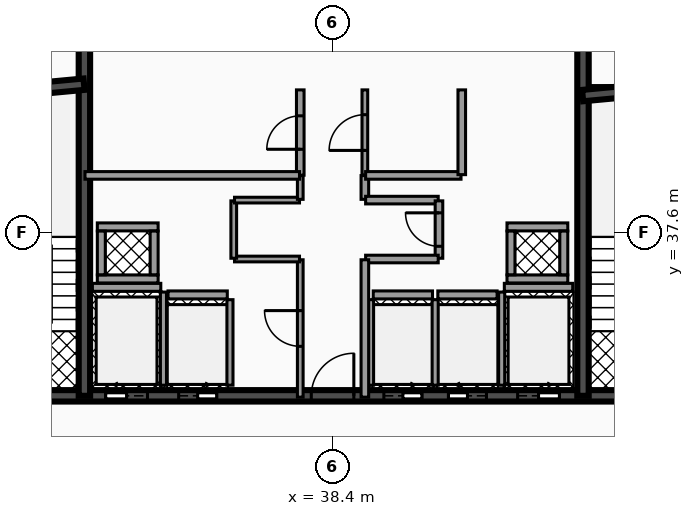
"""IFC4 building model, lengths in metres.
Left out: names, types, materials, properties, quantities, classifications, styles, units other than length and angle.
Written with IfcOpenShell. Run it as: python <this file> out.ifc"""

import sys

from ifc_helpers import new_model, si_unit, direction, frame, frame_2d, origin, place, context, subcontext, project, spatial, rectangle, extrude, element, fill, save


model = new_model("IFC4")
c1 = context("Model", 3, precision=1e-05, world=origin(), true_north=direction((0.0, 1.0)))
c2 = subcontext(c1, "Body", "Model", "MODEL_VIEW")
j1 = project(units=[si_unit("LENGTHUNIT", "METRE"), si_unit("PLANEANGLEUNIT", "RADIAN")], contexts=[c1])
p1 = place(None, origin())
s1 = spatial("IfcSite", under=j1, at=p1, CompositionType="ELEMENT")
p2 = place(p1, origin())
s2 = spatial("IfcBuilding", under=s1, at=p2, CompositionType="ELEMENT")
p3 = place(p2, frame((0.0, 0.0, 239.36)))
s3 = spatial("IfcBuildingStorey", under=s2, at=p3, CompositionType="ELEMENT", Elevation=239.36)
p4 = place(p3, frame((28.5, 33.3, 0.0), z_axis=(0.0, 0.0, 1.0), x_axis=(1.0, 0.0, 0.0)))
e1 = element("IfcWall", 1, at=p4, inside=s3, PredefinedType="SHEAR", context=c2, shape_type="SweptSolid", body=[
    extrude(rectangle(XDim=19.86, YDim=0.3, at=frame_2d((9.93, 0.0))), origin(), (0.0, 0.0, 1.0), 3.18),
])
p5 = place(p4, frame((3.93, 0.0, 0.0)))
e2 = element("IfcOpeningElement", 2, at=p5, cuts=e1, PredefinedType="OPENING", context=c2, shape_type="SweptSolid", body=[
    extrude(rectangle(XDim=1.1, YDim=2.15, at=frame_2d((0.55, 1.075))), frame((0.0, 0.16, 0.0), z_axis=(0.0, -1.0, 0.0), x_axis=(1.0, 0.0, 0.0)), (0.0, 0.0, 1.0), 0.32),
])
p6 = place(p4, frame((14.77, 0.0, 0.0)))
e3 = element("IfcOpeningElement", 3, at=p6, cuts=e1, PredefinedType="OPENING", context=c2, shape_type="SweptSolid", body=[
    extrude(rectangle(XDim=1.1, YDim=2.15, at=frame_2d((0.55, 1.075))), frame((0.0, 0.16, 0.0), z_axis=(0.0, -1.0, 0.0), x_axis=(1.0, 0.0, 0.0)), (0.0, 0.0, 1.0), 0.32),
])
p7 = place(p4, frame((11.25, 0.0, 0.0)))
e4 = element("IfcOpeningElement", 4, at=p7, cuts=e1, PredefinedType="OPENING", context=c2, shape_type="SweptSolid", body=[
    extrude(rectangle(XDim=1.0, YDim=2.1, at=frame_2d((0.5, 1.05))), frame((0.0, 0.16, 0.0), z_axis=(0.0, -1.0, 0.0), x_axis=(1.0, 0.0, 0.0)), (0.0, 0.0, 1.0), 0.32),
])
p8 = place(p4, frame((12.95, 0.0, 0.0)))
e5 = element("IfcOpeningElement", 5, at=p8, cuts=e1, PredefinedType="OPENING", context=c2, shape_type="SweptSolid", body=[
    extrude(rectangle(XDim=1.0, YDim=2.1, at=frame_2d((0.5, 1.05))), frame((0.0, 0.16, 0.0), z_axis=(0.0, -1.0, 0.0), x_axis=(1.0, 0.0, 0.0)), (0.0, 0.0, 1.0), 0.32),
])
p9 = place(p4, frame((5.85, 0.0, 0.0)))
e6 = element("IfcOpeningElement", 6, at=p9, cuts=e1, PredefinedType="OPENING", context=c2, shape_type="SweptSolid", body=[
    extrude(rectangle(XDim=1.0, YDim=2.1, at=frame_2d((0.5, 1.05))), frame((0.0, 0.16, 0.0), z_axis=(0.0, -1.0, 0.0), x_axis=(1.0, 0.0, 0.0)), (0.0, 0.0, 1.0), 0.32),
])
p10 = place(p4, frame((1.21, 0.0, 0.0)))
e7 = element("IfcOpeningElement", 7, at=p10, cuts=e1, PredefinedType="OPENING", context=c2, shape_type="SweptSolid", body=[
    extrude(rectangle(XDim=1.1, YDim=2.2, at=frame_2d((0.55, 1.1))), frame((0.0, 0.16, 0.0), z_axis=(0.0, -1.0, 0.0), x_axis=(1.0, 0.0, 0.0)), (0.0, 0.0, 1.0), 0.32),
])
p11 = place(p4, frame((9.34, 0.0, 0.0)))
e8 = element("IfcOpeningElement", 8, at=p11, cuts=e1, PredefinedType="OPENING", context=c2, shape_type="SweptSolid", body=[
    extrude(rectangle(XDim=1.12, YDim=2.05, at=frame_2d((0.56, 1.025))), frame((0.0, 0.16, 0.0), z_axis=(0.0, -1.0, 0.0), x_axis=(1.0, 0.0, 0.0)), (0.0, 0.0, 1.0), 0.32),
])
p12 = place(p4, frame((17.55, 0.0, 0.0)))
e9 = element("IfcOpeningElement", 9, at=p12, cuts=e1, PredefinedType="OPENING", context=c2, shape_type="SweptSolid", body=[
    extrude(rectangle(XDim=1.1, YDim=2.2, at=frame_2d((0.55, 1.1))), frame((0.0, 0.16, 0.0), z_axis=(0.0, -1.0, 0.0), x_axis=(1.0, 0.0, 0.0)), (0.0, 0.0, 1.0), 0.32),
])
for number, where, z_axis, x_axis in (
    (10, (31.87, 33.3, 0.0), (0.0, 0.0, 1.0), (0.0, 1.0, 0.0)),
    (11, (44.99, 33.3, 0.0), (0.0, 0.0, 1.0), (0.0, 1.0, 0.0)),
):
    element("IfcWall", number, at=place(p3, frame(where, z_axis=z_axis, x_axis=x_axis)), inside=s3, PredefinedType="SHEAR", context=c2, shape_type="SweptSolid", body=[
        extrude(rectangle(XDim=10.1, YDim=0.3, at=frame_2d((5.05, 0.0))), origin(), (0.0, 0.0, 1.0), 3.18),
    ])
p13 = place(p3, frame((28.64, 41.2, 0.0), z_axis=(0.0, 0.0, 1.0), x_axis=(0.995687118776, 0.092774789157, 0.0)))
e12 = element("IfcWall", 12, at=p13, inside=s3, PredefinedType="SHEAR", context=c2, shape_type="SweptSolid", body=[
    extrude(rectangle(XDim=3.234, YDim=0.3, at=frame_2d((1.617, 0.0))), origin(), (0.0, 0.0, 1.0), 3.18),
])
p14 = place(p3, frame((44.98, 41.2, 0.0), z_axis=(0.0, 0.0, 1.0), x_axis=(0.995686468965, 0.09278176286, 0.0)))
e13 = element("IfcWall", 13, at=p14, inside=s3, PredefinedType="SHEAR", context=c2, shape_type="SweptSolid", body=[
    extrude(rectangle(XDim=3.234, YDim=0.3, at=frame_2d((1.617, 0.0))), origin(), (0.0, 0.0, 1.0), 3.18),
])
p15 = place(p3, frame((32.08, 36.155, 0.0), z_axis=(0.0, 0.0, 1.0), x_axis=(1.0, 0.0, 0.0)))
e14 = element("IfcWall", 14, at=p15, inside=s3, PredefinedType="SOLIDWALL", context=c2, shape_type="SweptSolid", body=[
    extrude(rectangle(XDim=1.8, YDim=0.21, at=frame_2d((0.9, 0.0))), origin(), (0.0, 0.0, 1.0), 3.18),
])
p16 = place(p3, frame((33.95, 33.58, 0.0), z_axis=(0.0, 0.0, 1.0), x_axis=(0.0, 1.0, 0.0)))
e15 = element("IfcWall", 15, at=p16, inside=s3, PredefinedType="SOLIDWALL", context=c2, shape_type="SweptSolid", body=[
    extrude(rectangle(XDim=2.45, YDim=0.16, at=frame_2d((1.225, 0.0))), origin(), (0.0, 0.0, 1.0), 3.18),
])
p17 = place(p3, frame((42.92, 36.155, 0.0), z_axis=(0.0, 0.0, 1.0), x_axis=(1.0, 0.0, 0.0)))
e16 = element("IfcWall", 16, at=p17, inside=s3, PredefinedType="SOLIDWALL", context=c2, shape_type="SweptSolid", body=[
    extrude(rectangle(XDim=1.8, YDim=0.21, at=frame_2d((0.9, 0.0))), origin(), (0.0, 0.0, 1.0), 3.18),
])
p18 = place(p3, frame((42.85, 33.58, 0.0), z_axis=(0.0, 0.0, 1.0), x_axis=(0.0, 1.0, 0.0)))
e17 = element("IfcWall", 17, at=p18, inside=s3, PredefinedType="SOLIDWALL", context=c2, shape_type="SweptSolid", body=[
    extrude(rectangle(XDim=2.45, YDim=0.16, at=frame_2d((1.225, 0.0))), origin(), (0.0, 0.0, 1.0), 3.18),
])
p19 = place(p3, frame((39.47, 35.955, 0.0), z_axis=(0.0, 0.0, 1.0), x_axis=(1.0, 0.0, 0.0)))
e18 = element("IfcWall", 18, at=p19, inside=s3, PredefinedType="SOLIDWALL", context=c2, shape_type="SweptSolid", body=[
    extrude(rectangle(XDim=1.56, YDim=0.21, at=frame_2d((0.78, 0.0))), origin(), (0.0, 0.0, 1.0), 3.18),
])
for number, where, z_axis, x_axis in (
    (19, (39.4, 33.58, 0.0), (0.0, 0.0, 1.0), (0.0, 1.0, 0.0)),
    (20, (41.1, 33.58, 0.0), (0.0, 0.0, 1.0), (0.0, 1.0, 0.0)),
):
    element("IfcWall", number, at=place(p3, frame(where, z_axis=z_axis, x_axis=x_axis)), inside=s3, PredefinedType="SOLIDWALL", context=c2, shape_type="SweptSolid", body=[
        extrude(rectangle(XDim=2.25, YDim=0.16, at=frame_2d((1.125, 0.0))), origin(), (0.0, 0.0, 1.0), 3.18),
    ])
p20 = place(p3, frame((41.17, 35.955, 0.0), z_axis=(0.0, 0.0, 1.0), x_axis=(1.0, 0.0, 0.0)))
e21 = element("IfcWall", 21, at=p20, inside=s3, PredefinedType="SOLIDWALL", context=c2, shape_type="SweptSolid", body=[
    extrude(rectangle(XDim=1.56, YDim=0.21, at=frame_2d((0.78, 0.0))), origin(), (0.0, 0.0, 1.0), 3.18),
])
p21 = place(p3, frame((34.07, 35.955, 0.0), z_axis=(0.0, 0.0, 1.0), x_axis=(1.0, 0.0, 0.0)))
e22 = element("IfcWall", 22, at=p21, inside=s3, PredefinedType="SOLIDWALL", context=c2, shape_type="SweptSolid", body=[
    extrude(rectangle(XDim=1.56, YDim=0.21, at=frame_2d((0.78, 0.0))), origin(), (0.0, 0.0, 1.0), 3.18),
])
p22 = place(p3, frame((35.7, 33.58, 0.0), z_axis=(0.0, 0.0, 1.0), x_axis=(0.0, 1.0, 0.0)))
e23 = element("IfcWall", 23, at=p22, inside=s3, PredefinedType="SOLIDWALL", context=c2, shape_type="SweptSolid", body=[
    extrude(rectangle(XDim=2.25, YDim=0.16, at=frame_2d((1.125, 0.0))), origin(), (0.0, 0.0, 1.0), 3.18),
])
for number, where, z_axis, x_axis in (
    (24, (32.21, 36.375, 0.0), (0.0, 0.0, 1.0), (1.0, 0.0, 0.0)),
    (25, (32.21, 37.745, 0.0), (0.0, 0.0, 1.0), (1.0, 0.0, 0.0)),
):
    element("IfcWall", number, at=place(p3, frame(where, z_axis=z_axis, x_axis=x_axis)), inside=s3, PredefinedType="SOLIDWALL", context=c2, shape_type="SweptSolid", body=[
        extrude(rectangle(XDim=1.6, YDim=0.21, at=frame_2d((0.8, 0.0))), origin(), (0.0, 0.0, 1.0), 3.18),
    ])
for number, where, z_axis, x_axis in (
    (26, (32.315, 36.485, 0.0), (0.0, 0.0, 1.0), (0.0, 1.0, 0.0)),
    (27, (33.705, 36.485, 0.0), (0.0, 0.0, 1.0), (0.0, 1.0, 0.0)),
):
    element("IfcWall", number, at=place(p3, frame(where, z_axis=z_axis, x_axis=x_axis)), inside=s3, PredefinedType="SOLIDWALL", context=c2, shape_type="SweptSolid", body=[
        extrude(rectangle(XDim=1.15, YDim=0.21, at=frame_2d((0.575, 0.0))), origin(), (0.0, 0.0, 1.0), 3.18),
    ])
for number, where, z_axis, x_axis in (
    (28, (42.99, 36.375, 0.0), (0.0, 0.0, 1.0), (1.0, 0.0, 0.0)),
    (29, (42.99, 37.745, 0.0), (0.0, 0.0, 1.0), (1.0, 0.0, 0.0)),
):
    element("IfcWall", number, at=place(p3, frame(where, z_axis=z_axis, x_axis=x_axis)), inside=s3, PredefinedType="SOLIDWALL", context=c2, shape_type="SweptSolid", body=[
        extrude(rectangle(XDim=1.6, YDim=0.21, at=frame_2d((0.8, 0.0))), origin(), (0.0, 0.0, 1.0), 3.18),
    ])
for number, where, z_axis, x_axis in (
    (30, (43.095, 36.485, 0.0), (0.0, 0.0, 1.0), (0.0, 1.0, 0.0)),
    (31, (44.485, 36.485, 0.0), (0.0, 0.0, 1.0), (0.0, 1.0, 0.0)),
):
    element("IfcWall", number, at=place(p3, frame(where, z_axis=z_axis, x_axis=x_axis)), inside=s3, PredefinedType="SOLIDWALL", context=c2, shape_type="SweptSolid", body=[
        extrude(rectangle(XDim=1.15, YDim=0.21, at=frame_2d((0.575, 0.0))), origin(), (0.0, 0.0, 1.0), 3.18),
    ])
p23 = place(p3, frame((37.55, 33.265, 0.0), z_axis=(0.0, 0.0, 1.0), x_axis=(0.0, 1.0, 0.0)))
e32 = element("IfcWall", 32, at=p23, inside=s3, PredefinedType="PARTITIONING", context=c2, shape_type="SweptSolid", body=[
    extrude(rectangle(XDim=3.615, YDim=0.15, at=frame_2d((1.808, 0.0))), origin(), (0.0, 0.0, 1.0), 2.235),
])
p24 = place(p23, frame((1.337, 0.0, 0.0)))
e33 = element("IfcOpeningElement", 33, at=p24, cuts=e32, PredefinedType="OPENING", context=c2, shape_type="SweptSolid", body=[
    extrude(rectangle(XDim=0.94, YDim=2.05, at=frame_2d((0.47, 1.025))), frame((0.0, 0.085, 0.0), z_axis=(0.0, -1.0, 0.0), x_axis=(1.0, 0.0, 0.0)), (0.0, 0.0, 1.0), 0.17),
])
p25 = place(p3, frame((35.82, 36.9, 0.0), z_axis=(0.0, 0.0, 1.0), x_axis=(1.0, 0.0, 0.0)))
e34 = element("IfcWall", 34, at=p25, inside=s3, PredefinedType="PARTITIONING", context=c2, shape_type="SweptSolid", body=[
    extrude(rectangle(XDim=1.71, YDim=0.15, at=frame_2d((0.855, 0.0))), origin(), (0.0, 0.0, 1.0), 2.235),
])
p26 = place(p3, frame((35.8, 36.92, 0.0), z_axis=(0.0, 0.0, 1.0), x_axis=(0.0, 1.0, 0.0)))
e35 = element("IfcWall", 35, at=p26, inside=s3, PredefinedType="PARTITIONING", context=c2, shape_type="SweptSolid", body=[
    extrude(rectangle(XDim=1.51, YDim=0.15, at=frame_2d((0.755, 0.0))), origin(), (0.0, 0.0, 1.0), 2.235),
])
p27 = place(p3, frame((35.82, 38.45, 0.0), z_axis=(0.0, 0.0, 1.0), x_axis=(1.0, 0.0, 0.0)))
e36 = element("IfcWall", 36, at=p27, inside=s3, PredefinedType="PARTITIONING", context=c2, shape_type="SweptSolid", body=[
    extrude(rectangle(XDim=1.71, YDim=0.15, at=frame_2d((0.855, 0.0))), origin(), (0.0, 0.0, 1.0), 2.235),
])
p28 = place(p3, frame((37.55, 38.47, 0.0), z_axis=(0.0, 0.0, 1.0), x_axis=(0.0, 1.0, 0.0)))
e37 = element("IfcWall", 37, at=p28, inside=s3, PredefinedType="PARTITIONING", context=c2, shape_type="SweptSolid", body=[
    extrude(rectangle(XDim=0.625, YDim=0.15, at=frame_2d((0.312, 0.0))), origin(), (0.0, 0.0, 1.0), 2.235),
])
p29 = place(p3, frame((37.55, 39.105, 0.0), z_axis=(0.0, 0.0, 1.0), x_axis=(0.0, 1.0, 0.0)))
e38 = element("IfcWall", 38, at=p29, inside=s3, PredefinedType="PARTITIONING", context=c2, shape_type="SweptSolid", body=[
    extrude(rectangle(XDim=2.245, YDim=0.2, at=frame_2d((1.123, 0.0))), origin(), (0.0, 0.0, 1.0), 2.235),
])
p30 = place(p29, frame((0.683, 0.0, 0.0)))
e39 = element("IfcOpeningElement", 39, at=p30, cuts=e38, PredefinedType="OPENING", context=c2, shape_type="SweptSolid", body=[
    extrude(rectangle(XDim=0.88, YDim=2.05, at=frame_2d((0.44, 1.025))), frame((0.0, 0.11, 0.0), z_axis=(0.0, -1.0, 0.0), x_axis=(1.0, 0.0, 0.0)), (0.0, 0.0, 1.0), 0.22),
])
p31 = place(p3, frame((39.25, 38.47, 0.0), z_axis=(0.0, 0.0, 1.0), x_axis=(0.0, 1.0, 0.0)))
e40 = element("IfcWall", 40, at=p31, inside=s3, PredefinedType="PARTITIONING", context=c2, shape_type="SweptSolid", body=[
    extrude(rectangle(XDim=0.625, YDim=0.2, at=frame_2d((0.312, 0.0))), origin(), (0.0, 0.0, 1.0), 2.235),
])
p32 = place(p3, frame((39.27, 38.45, 0.0), z_axis=(0.0, 0.0, 1.0), x_axis=(1.0, 0.0, 0.0)))
e41 = element("IfcWall", 41, at=p32, inside=s3, PredefinedType="PARTITIONING", context=c2, shape_type="SweptSolid", body=[
    extrude(rectangle(XDim=1.91, YDim=0.2, at=frame_2d((0.955, 0.0))), origin(), (0.0, 0.0, 1.0), 2.235),
])
p33 = place(p3, frame((41.2, 36.92, 0.0), z_axis=(0.0, 0.0, 1.0), x_axis=(0.0, 1.0, 0.0)))
e42 = element("IfcWall", 42, at=p33, inside=s3, PredefinedType="PARTITIONING", context=c2, shape_type="SweptSolid", body=[
    extrude(rectangle(XDim=1.51, YDim=0.2, at=frame_2d((0.755, 0.0))), origin(), (0.0, 0.0, 1.0), 2.235),
])
p34 = place(p33, frame((0.315, 0.0, 0.0)))
e43 = element("IfcOpeningElement", 43, at=p34, cuts=e42, PredefinedType="OPENING", context=c2, shape_type="SweptSolid", body=[
    extrude(rectangle(XDim=0.88, YDim=2.05, at=frame_2d((0.44, 1.025))), frame((0.0, 0.11, 0.0), z_axis=(0.0, -1.0, 0.0), x_axis=(1.0, 0.0, 0.0)), (0.0, 0.0, 1.0), 0.22),
])
p35 = place(p3, frame((39.27, 36.9, 0.0), z_axis=(0.0, 0.0, 1.0), x_axis=(1.0, 0.0, 0.0)))
e44 = element("IfcWall", 44, at=p35, inside=s3, PredefinedType="PARTITIONING", context=c2, shape_type="SweptSolid", body=[
    extrude(rectangle(XDim=1.91, YDim=0.2, at=frame_2d((0.955, 0.0))), origin(), (0.0, 0.0, 1.0), 2.235),
])
p36 = place(p3, frame((39.25, 33.265, 0.0), z_axis=(0.0, 0.0, 1.0), x_axis=(0.0, 1.0, 0.0)))
e45 = element("IfcWall", 45, at=p36, inside=s3, PredefinedType="PARTITIONING", context=c2, shape_type="SweptSolid", body=[
    extrude(rectangle(XDim=3.615, YDim=0.2, at=frame_2d((1.808, 0.0))), origin(), (0.0, 0.0, 1.0), 2.235),
])
p37 = place(p3, frame((39.25, 39.105, 0.0), z_axis=(0.0, 0.0, 1.0), x_axis=(0.0, 1.0, 0.0)))
e46 = element("IfcWall", 46, at=p37, inside=s3, PredefinedType="PARTITIONING", context=c2, shape_type="SweptSolid", body=[
    extrude(rectangle(XDim=2.245, YDim=0.15, at=frame_2d((1.123, 0.0))), origin(), (0.0, 0.0, 1.0), 2.235),
])
p38 = place(p37, frame((0.653, 0.0, 0.0)))
e47 = element("IfcOpeningElement", 47, at=p38, cuts=e46, PredefinedType="OPENING", context=c2, shape_type="SweptSolid", body=[
    extrude(rectangle(XDim=0.94, YDim=2.05, at=frame_2d((0.47, 1.025))), frame((0.0, 0.085, 0.0), z_axis=(0.0, -1.0, 0.0), x_axis=(1.0, 0.0, 0.0)), (0.0, 0.0, 1.0), 0.17),
])
p39 = place(p3, frame((31.885, 39.1, 0.0), z_axis=(0.0, 0.0, 1.0), x_axis=(1.0, 0.0, 0.0)))
e48 = element("IfcWall", 48, at=p39, inside=s3, PredefinedType="PARTITIONING", context=c2, shape_type="SweptSolid", body=[
    extrude(rectangle(XDim=5.645, YDim=0.2, at=frame_2d((2.823, 0.0))), origin(), (0.0, 0.0, 1.0), 2.235),
])
p40 = place(p3, frame((39.27, 39.1, 0.0), z_axis=(0.0, 0.0, 1.0), x_axis=(1.0, 0.0, 0.0)))
e49 = element("IfcWall", 49, at=p40, inside=s3, PredefinedType="PARTITIONING", context=c2, shape_type="SweptSolid", body=[
    extrude(rectangle(XDim=2.51, YDim=0.2, at=frame_2d((1.255, 0.0))), origin(), (0.0, 0.0, 1.0), 2.235),
])
p41 = place(p3, frame((41.8, 39.12, 0.0), z_axis=(0.0, 0.0, 1.0), x_axis=(0.0, 1.0, 0.0)))
e50 = element("IfcWall", 50, at=p41, inside=s3, PredefinedType="PARTITIONING", context=c2, shape_type="SweptSolid", body=[
    extrude(rectangle(XDim=2.23, YDim=0.2, at=frame_2d((1.115, 0.0))), origin(), (0.0, 0.0, 1.0), 2.235),
])
p42 = place(p5, origin())
e51 = element("IfcDoor", 51, at=p42, inside=s3, OperationType="SLIDING_TO_LEFT", PredefinedType="DOOR", context=c2, shape_type="SweptSolid", body=[
    extrude(rectangle(XDim=1.1, YDim=2.15, at=frame_2d((0.55, 1.075))), frame((0.0, 0.025, 0.0), z_axis=(0.0, -1.0, 0.0), x_axis=(1.0, 0.0, 0.0)), (0.0, 0.0, 1.0), 0.05),
])
fill(e2, e51)
p43 = place(p6, origin())
e52 = element("IfcDoor", 52, at=p43, inside=s3, OperationType="SLIDING_TO_RIGHT", PredefinedType="DOOR", context=c2, shape_type="SweptSolid", body=[
    extrude(rectangle(XDim=1.1, YDim=2.15, at=frame_2d((0.55, 1.075))), frame((0.0, 0.025, 0.0), z_axis=(0.0, -1.0, 0.0), x_axis=(1.0, 0.0, 0.0)), (0.0, 0.0, 1.0), 0.05),
])
fill(e3, e52)
p44 = place(p7, origin())
e53 = element("IfcDoor", 53, at=p44, inside=s3, OperationType="SLIDING_TO_RIGHT", PredefinedType="DOOR", context=c2, shape_type="SweptSolid", body=[
    extrude(rectangle(XDim=1.0, YDim=2.1, at=frame_2d((0.5, 1.05))), frame((0.0, 0.025, 0.0), z_axis=(0.0, -1.0, 0.0), x_axis=(1.0, 0.0, 0.0)), (0.0, 0.0, 1.0), 0.05),
])
fill(e4, e53)
p45 = place(p8, origin())
e54 = element("IfcDoor", 54, at=p45, inside=s3, OperationType="SLIDING_TO_LEFT", PredefinedType="DOOR", context=c2, shape_type="SweptSolid", body=[
    extrude(rectangle(XDim=1.0, YDim=2.1, at=frame_2d((0.5, 1.05))), frame((0.0, 0.025, 0.0), z_axis=(0.0, -1.0, 0.0), x_axis=(1.0, 0.0, 0.0)), (0.0, 0.0, 1.0), 0.05),
])
fill(e5, e54)
p46 = place(p9, origin())
e55 = element("IfcDoor", 55, at=p46, inside=s3, OperationType="SLIDING_TO_RIGHT", PredefinedType="DOOR", context=c2, shape_type="SweptSolid", body=[
    extrude(rectangle(XDim=1.0, YDim=2.1, at=frame_2d((0.5, 1.05))), frame((0.0, 0.025, 0.0), z_axis=(0.0, -1.0, 0.0), x_axis=(1.0, 0.0, 0.0)), (0.0, 0.0, 1.0), 0.05),
])
fill(e6, e55)
p47 = place(p11, origin())
e56 = element("IfcDoor", 56, at=p47, inside=s3, OperationType="SINGLE_SWING_RIGHT", PredefinedType="DOOR", context=c2, shape_type="SweptSolid", body=[
    extrude(rectangle(XDim=1.12, YDim=2.05, at=frame_2d((0.56, 1.025))), frame((0.0, 0.025, 0.0), z_axis=(0.0, -1.0, 0.0), x_axis=(1.0, 0.0, 0.0)), (0.0, 0.0, 1.0), 0.05),
])
fill(e8, e56)
p48 = place(p24, origin())
e57 = element("IfcDoor", 57, at=p48, inside=s3, OperationType="SINGLE_SWING_RIGHT", PredefinedType="DOOR", context=c2, shape_type="SweptSolid", body=[
    extrude(rectangle(XDim=0.94, YDim=2.05, at=frame_2d((0.47, 1.025))), frame((0.0, 0.025, 0.0), z_axis=(0.0, -1.0, 0.0), x_axis=(1.0, 0.0, 0.0)), (0.0, 0.0, 1.0), 0.05),
])
fill(e33, e57)
p49 = place(p30, origin())
e58 = element("IfcDoor", 58, at=p49, inside=s3, OperationType="SINGLE_SWING_LEFT", PredefinedType="DOOR", context=c2, shape_type="SweptSolid", body=[
    extrude(rectangle(XDim=0.88, YDim=2.05, at=frame_2d((0.44, 1.025))), frame((0.0, 0.025, 0.0), z_axis=(0.0, -1.0, 0.0), x_axis=(1.0, 0.0, 0.0)), (0.0, 0.0, 1.0), 0.05),
])
fill(e39, e58)
p50 = place(p34, origin())
e59 = element("IfcDoor", 59, at=p50, inside=s3, OperationType="SINGLE_SWING_RIGHT", PredefinedType="DOOR", context=c2, shape_type="SweptSolid", body=[
    extrude(rectangle(XDim=0.88, YDim=2.05, at=frame_2d((0.44, 1.025))), frame((0.0, 0.025, 0.0), z_axis=(0.0, -1.0, 0.0), x_axis=(1.0, 0.0, 0.0)), (0.0, 0.0, 1.0), 0.05),
])
fill(e43, e59)
p51 = place(p38, origin())
e60 = element("IfcDoor", 60, at=p51, inside=s3, OperationType="SINGLE_SWING_LEFT", PredefinedType="DOOR", context=c2, shape_type="SweptSolid", body=[
    extrude(rectangle(XDim=0.94, YDim=2.05, at=frame_2d((0.47, 1.025))), frame((0.0, 0.025, 0.0), z_axis=(0.0, -1.0, 0.0), x_axis=(1.0, 0.0, 0.0)), (0.0, 0.0, 1.0), 0.05),
])
fill(e47, e60)
save(model, sys.argv[1])
